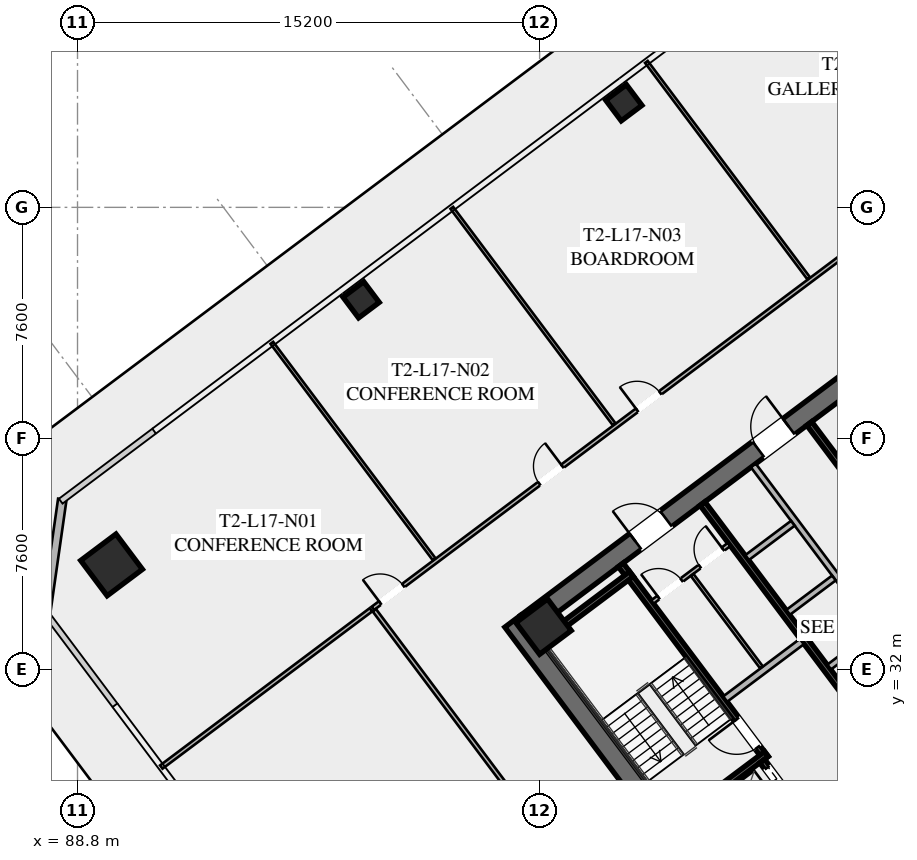
"""IFC4 building model, lengths in metres.
Left out: names, types, materials, properties, quantities, classifications, styles, units other than length and angle.
Written with IfcOpenShell. Run it as: python <this file> out.ifc"""

import sys

from ifc_helpers import new_model, si_unit, direction, frame, frame_2d, origin, origin_2d, place, context, subcontext, project, spatial, rectangle, hollow_rectangle, extrude, element, fill, save


model = new_model("IFC4")
c1 = context("Model", 3, precision=1e-05, world=origin(), true_north=direction((0.0, 1.0)))
c2 = subcontext(c1, "Body", "Model", "MODEL_VIEW")
j1 = project(units=[si_unit("LENGTHUNIT", "METRE"), si_unit("PLANEANGLEUNIT", "RADIAN")], contexts=[c1])
p1 = place(None, origin())
s1 = spatial("IfcSite", under=j1, at=p1, CompositionType="ELEMENT")
p2 = place(p1, origin())
s2 = spatial("IfcBuilding", under=s1, at=p2, CompositionType="ELEMENT")
p3 = place(p2, frame((0.0, 0.0, 67.2)))
s3 = spatial("IfcBuildingStorey", under=s2, at=p3, CompositionType="ELEMENT", Elevation=67.2)
p4 = place(p3, frame((112.476, 21.107, 0.0), z_axis=(0.0, 0.0, 1.0), x_axis=(-0.600005007985, 0.799996243986, 0.0)))
e1 = element("IfcWall", 1, at=p4, inside=s3, PredefinedType="SHEAR", context=c2, shape_type="SweptSolid", body=[
    extrude(rectangle(XDim=15.6, YDim=0.65, at=frame_2d((7.8, 0.0))), origin(), (0.0, 0.0, 1.0), 3.55),
])
p5 = place(p3, frame((124.429, 30.478, 0.0), z_axis=(0.0, 0.0, 1.0), x_axis=(-0.799998028465, -0.600002628705, 0.0)))
e2 = element("IfcWall", 2, at=p5, inside=s3, PredefinedType="SHEAR", context=c2, shape_type="SweptSolid", body=[
    extrude(rectangle(XDim=14.86, YDim=0.65, at=frame_2d((7.43, 0.0))), origin(), (0.0, 0.0, 1.0), 3.55),
])
p6 = place(p5, frame((9.13, 0.0, 0.0)))
e3 = element("IfcOpeningElement", 3, at=p6, cuts=e2, PredefinedType="OPENING", context=c2, shape_type="SweptSolid", body=[
    extrude(rectangle(XDim=1.25, YDim=2.25, at=frame_2d((0.625, 1.125))), frame((0.0, 0.335, 0.0), z_axis=(0.0, -1.0, 0.0), x_axis=(1.0, 0.0, 0.0)), (0.0, 0.0, 1.0), 0.67),
])
p7 = place(p5, frame((4.08, 0.0, 0.0)))
e4 = element("IfcOpeningElement", 4, at=p7, cuts=e2, PredefinedType="OPENING", context=c2, shape_type="SweptSolid", body=[
    extrude(rectangle(XDim=1.25, YDim=2.25, at=frame_2d((0.625, 1.125))), frame((0.0, 0.335, 0.0), z_axis=(0.0, -1.0, 0.0), x_axis=(1.0, 0.0, 0.0)), (0.0, 0.0, 1.0), 0.67),
])
p8 = place(p3, frame((103.571, 33.522, 0.0), z_axis=(0.0, 0.0, 1.0), x_axis=(0.799998028465, 0.600002628705, 0.0)))
e5 = element("IfcWall", 5, at=p8, inside=s3, PredefinedType="SHEAR", context=c2, shape_type="SweptSolid", body=[
    extrude(rectangle(XDim=14.86, YDim=0.65, at=frame_2d((7.43, 0.0))), origin(), (0.0, 0.0, 1.0), 3.55),
])
p9 = place(p8, frame((4.48, 0.0, 0.0)))
e6 = element("IfcOpeningElement", 6, at=p9, cuts=e5, PredefinedType="OPENING", context=c2, shape_type="SweptSolid", body=[
    extrude(rectangle(XDim=1.25, YDim=2.25, at=frame_2d((0.625, 1.125))), frame((0.0, 0.335, 0.0), z_axis=(0.0, -1.0, 0.0), x_axis=(1.0, 0.0, 0.0)), (0.0, 0.0, 1.0), 0.67),
])
p10 = place(p8, frame((9.53, 0.0, 0.0)))
e7 = element("IfcOpeningElement", 7, at=p10, cuts=e5, PredefinedType="OPENING", context=c2, shape_type="SweptSolid", body=[
    extrude(rectangle(XDim=1.25, YDim=2.25, at=frame_2d((0.625, 1.125))), frame((0.0, 0.335, 0.0), z_axis=(0.0, -1.0, 0.0), x_axis=(1.0, 0.0, 0.0)), (0.0, 0.0, 1.0), 0.67),
])
p11 = place(p3, frame((104.13, 33.41, 0.0), z_axis=(0.0, 0.0, 1.0), x_axis=(0.799999996291, 0.600000004945, 0.0)))
e8 = element("IfcColumn", 8, at=p11, inside=s3, PredefinedType="COLUMN", context=c2, shape_type="SweptSolid", body=[
    extrude(hollow_rectangle(XDim=1.3, YDim=1.3, WallThickness=0.05, at=origin_2d()), origin(), (0.0, 0.0, 1.0), 3.35),
])
p12 = place(p3, frame((89.92, 35.44, -0.195), z_axis=(0.0, 0.0, 1.0), x_axis=(0.799999996291, 0.600000004945, 0.0)))
e9 = element("IfcColumn", 9, at=p12, inside=s3, PredefinedType="COLUMN", context=c2, shape_type="SweptSolid", body=[
    extrude(hollow_rectangle(XDim=1.45, YDim=1.45, WallThickness=0.055, at=origin_2d()), origin(), (0.0, 0.0, 1.0), 3.545),
])
for number, where, z_axis, x_axis in (
    (10, (106.77, 50.64, -0.195), (0.0, 0.0, 1.0), (0.8, 0.6, 0.0)),
    (11, (98.13, 44.16, -0.195), (0.0, 0.0, 1.0), (0.8, 0.6, 0.0)),
):
    element("IfcColumn", number, at=place(p3, frame(where, z_axis=z_axis, x_axis=x_axis)), inside=s3, PredefinedType="COLUMN", context=c2, shape_type="SweptSolid", body=[
        extrude(hollow_rectangle(XDim=0.85, YDim=0.85, WallThickness=0.035, at=origin_2d()), origin(), (0.0, 0.0, 1.0), 3.545),
    ])
p13 = place(p3, frame((87.76, 33.82, 0.0), z_axis=(0.0, 0.0, 1.0), x_axis=(0.141430307517, 0.989948214866, 0.0)))
e12 = element("IfcWall", 12, at=p13, inside=s3, PredefinedType="SOLIDWALL", context=c2, shape_type="SweptSolid", body=[
    extrude(rectangle(XDim=3.818, YDim=0.28, at=frame_2d((1.909, 0.0))), origin(), (0.0, 0.0, 1.0), 3.35),
])
p14 = place(p3, frame((111.44, 29.08, 0.0), z_axis=(0.0, 0.0, 1.0), x_axis=(-0.600009827119, 0.799992629566, 0.0)))
e13 = element("IfcWall", 13, at=p14, inside=s3, PredefinedType="SHEAR", context=c2, shape_type="SweptSolid", body=[
    extrude(rectangle(XDim=7.95, YDim=0.2, at=frame_2d((3.975, 0.0))), origin(), (0.0, 0.0, 1.0), 3.35),
])
p15 = place(p14, frame((0.45, 0.0, 0.0)))
e14 = element("IfcOpeningElement", 14, at=p15, cuts=e13, PredefinedType="OPENING", context=c2, shape_type="SweptSolid", body=[
    extrude(rectangle(XDim=1.15, YDim=2.2, at=frame_2d((0.575, 1.1))), frame((0.0, 0.11, 0.0), z_axis=(0.0, -1.0, 0.0), x_axis=(1.0, 0.0, 0.0)), (0.0, 0.0, 1.0), 0.22),
])
for number, where, z_axis, x_axis in (
    (15, (108.476, 26.982, 0.0), (0.0, 0.0, 1.0), (0.8, 0.6, 0.0)),
    (16, (104.036, 32.902, 0.0), (0.0, 0.0, 1.0), (0.8, 0.6, 0.0)),
):
    element("IfcWall", number, at=place(p3, frame(where, z_axis=z_axis, x_axis=x_axis)), inside=s3, PredefinedType="SHEAR", context=c2, shape_type="SweptSolid", body=[
        extrude(rectangle(XDim=3.73, YDim=0.2, at=frame_2d((1.865, 0.0))), origin(), (0.0, 0.0, 1.0), 3.35),
    ])
p16 = place(p3, frame((117.938, 26.016, 0.0), z_axis=(0.0, 0.0, 1.0), x_axis=(-0.600005463273, 0.799995902516, 0.0)))
e17 = element("IfcWall", 17, at=p16, inside=s3, PredefinedType="SHEAR", context=c2, shape_type="SweptSolid", body=[
    extrude(rectangle(XDim=14.3, YDim=0.2, at=frame_2d((7.15, 0.0))), origin(), (0.0, 0.0, 1.0), 3.35),
])
p17 = place(p3, frame((110.104, 31.028, 0.0), z_axis=(0.0, 0.0, 1.0), x_axis=(0.800018601094, 0.59997519774, 0.0)))
e18 = element("IfcWall", 18, at=p17, inside=s3, PredefinedType="SOLIDWALL", context=c2, shape_type="SweptSolid", body=[
    extrude(rectangle(XDim=3.15, YDim=0.22, at=frame_2d((1.575, 0.0))), origin(), (0.0, 0.0, 1.0), 2.703),
])
p18 = place(p3, frame((115.13, 23.91, 0.0), z_axis=(0.0, 0.0, 1.0), x_axis=(-0.599975393228, 0.800018454488, 0.0)))
e19 = element("IfcWall", 19, at=p18, inside=s3, PredefinedType="SHEAR", context=c2, shape_type="SweptSolid", body=[
    extrude(rectangle(XDim=6.35, YDim=0.2, at=frame_2d((3.175, 0.0))), origin(), (0.0, 0.0, 1.0), 3.35),
])
p19 = place(p18, frame((4.775, 0.0, 0.0)))
e20 = element("IfcOpeningElement", 20, at=p19, cuts=e19, PredefinedType="OPENING", context=c2, shape_type="SweptSolid", body=[
    extrude(rectangle(XDim=1.3, YDim=2.25, at=frame_2d((0.65, 1.125))), frame((0.0, 0.11, 0.0), z_axis=(0.0, -1.0, 0.0), x_axis=(1.0, 0.0, 0.0)), (0.0, 0.0, 1.0), 0.22),
])
p20 = place(p18, frame((2.775, 0.0, 0.0)))
e21 = element("IfcOpeningElement", 21, at=p20, cuts=e19, PredefinedType="OPENING", context=c2, shape_type="SweptSolid", body=[
    extrude(rectangle(XDim=1.3, YDim=2.25, at=frame_2d((0.65, 1.125))), frame((0.0, 0.11, 0.0), z_axis=(0.0, -1.0, 0.0), x_axis=(1.0, 0.0, 0.0)), (0.0, 0.0, 1.0), 0.22),
])
p21 = place(p18, frame((0.575, 0.0, 0.0)))
e22 = element("IfcOpeningElement", 22, at=p21, cuts=e19, PredefinedType="OPENING", context=c2, shape_type="SweptSolid", body=[
    extrude(rectangle(XDim=1.3, YDim=2.25, at=frame_2d((0.65, 1.125))), frame((0.0, 0.11, 0.0), z_axis=(0.0, -1.0, 0.0), x_axis=(1.0, 0.0, 0.0)), (0.0, 0.0, 1.0), 0.22),
])
p22 = place(p3, frame((112.87, 40.09, 0.0), z_axis=(0.0, 0.0, 1.0), x_axis=(0.599975393228, -0.800018454488, 0.0)))
e23 = element("IfcWall", 23, at=p22, inside=s3, PredefinedType="SHEAR", context=c2, shape_type="SweptSolid", body=[
    extrude(rectangle(XDim=6.35, YDim=0.2, at=frame_2d((3.175, 0.0))), origin(), (0.0, 0.0, 1.0), 3.35),
])
p23 = place(p3, frame((107.71, 34.22, 0.0), z_axis=(0.0, 0.0, 1.0), x_axis=(0.799981399002, 0.60002480053, 0.0)))
e24 = element("IfcWall", 24, at=p23, inside=s3, PredefinedType="PARTITIONING", context=c2, shape_type="SweptSolid", body=[
    extrude(rectangle(XDim=3.15, YDim=0.135, at=frame_2d((1.575, 0.0))), origin(), (0.0, 0.0, 1.0), 2.703),
])
p24 = place(p23, frame((0.25, 0.0, 0.0)))
e25 = element("IfcOpeningElement", 25, at=p24, cuts=e24, PredefinedType="OPENING", context=c2, shape_type="SweptSolid", body=[
    extrude(rectangle(XDim=0.95, YDim=2.05, at=frame_2d((0.475, 1.025))), frame((0.0, 0.077, 0.0), z_axis=(0.0, -1.0, 0.0), x_axis=(1.0, 0.0, 0.0)), (0.0, 0.0, 1.0), 0.155),
])
p25 = place(p23, frame((1.95, 0.0, 0.0)))
e26 = element("IfcOpeningElement", 26, at=p25, cuts=e24, PredefinedType="OPENING", context=c2, shape_type="SweptSolid", body=[
    extrude(rectangle(XDim=0.95, YDim=2.05, at=frame_2d((0.475, 1.025))), frame((0.0, 0.077, 0.0), z_axis=(0.0, -1.0, 0.0), x_axis=(1.0, 0.0, 0.0)), (0.0, 0.0, 1.0), 0.155),
])
p26 = place(p3, frame((111.296, 32.072, 0.0), z_axis=(0.0, 0.0, 1.0), x_axis=(-0.59995887973, 0.800030838552, 0.0)))
e27 = element("IfcWall", 27, at=p26, inside=s3, PredefinedType="PARTITIONING", context=c2, shape_type="SweptSolid", body=[
    extrude(rectangle(XDim=3.8, YDim=0.11, at=frame_2d((1.9, 0.0))), origin(), (0.0, 0.0, 1.0), 2.703),
])
p27 = place(p3, frame((115.11, 33.27, 0.0), z_axis=(0.0, 0.0, 1.0), x_axis=(-0.600011488909, 0.79999138319, 0.0)))
e28 = element("IfcWall", 28, at=p27, inside=s3, PredefinedType="SOLIDWALL", context=c2, shape_type="SweptSolid", body=[
    extrude(rectangle(XDim=6.8, YDim=0.2, at=frame_2d((3.4, 0.0))), origin(), (0.0, 0.0, 1.0), 3.35),
])
p28 = place(p3, frame((113.526, 32.082, 0.0), z_axis=(0.0, 0.0, 1.0), x_axis=(0.800046745961, 0.599937666993, 0.0)))
e29 = element("IfcWall", 29, at=p28, inside=s3, PredefinedType="SOLIDWALL", context=c2, shape_type="SweptSolid", body=[
    extrude(rectangle(XDim=1.88, YDim=0.2, at=frame_2d((0.94, 0.0))), origin(), (0.0, 0.0, 1.0), 3.35),
])
p29 = place(p3, frame((112.176, 33.882, 0.0), z_axis=(0.0, 0.0, 1.0), x_axis=(0.8, 0.6, 0.0)))
e30 = element("IfcWall", 30, at=p29, inside=s3, PredefinedType="SOLIDWALL", context=c2, shape_type="SweptSolid", body=[
    extrude(rectangle(XDim=1.88, YDim=0.2, at=frame_2d((0.94, 0.0))), origin(), (0.0, 0.0, 1.0), 3.35),
])
p30 = place(p3, frame((110.826, 35.682, 0.0), z_axis=(0.0, 0.0, 1.0), x_axis=(0.799984418148, 0.600020775241, 0.0)))
e31 = element("IfcWall", 31, at=p30, inside=s3, PredefinedType="SOLIDWALL", context=c2, shape_type="SweptSolid", body=[
    extrude(rectangle(XDim=1.88, YDim=0.2, at=frame_2d((0.94, 0.0))), origin(), (0.0, 0.0, 1.0), 3.35),
])
p31 = place(p3, frame((98.516, 34.012, 0.0), z_axis=(0.0, 0.0, 1.0), x_axis=(0.8, 0.6, 0.0)))
e32 = element("IfcWall", 32, at=p31, inside=s3, PredefinedType="PARTITIONING", context=c2, shape_type="SweptSolid", body=[
    extrude(rectangle(XDim=28.23, YDim=0.135, at=frame_2d((14.115, 0.0))), origin(), (0.0, 0.0, 1.0), 2.703),
])
p32 = place(p31, frame((0.3, 0.0, 0.0)))
e33 = element("IfcOpeningElement", 33, at=p32, cuts=e32, PredefinedType="OPENING", context=c2, shape_type="SweptSolid", body=[
    extrude(rectangle(XDim=0.95, YDim=2.05, at=frame_2d((0.475, 1.025))), frame((0.0, 0.077, 0.0), z_axis=(0.0, -1.0, 0.0), x_axis=(1.0, 0.0, 0.0)), (0.0, 0.0, 1.0), 0.155),
])
p33 = place(p31, frame((6.84, 0.0, 0.0)))
e34 = element("IfcOpeningElement", 34, at=p33, cuts=e32, PredefinedType="OPENING", context=c2, shape_type="SweptSolid", body=[
    extrude(rectangle(XDim=0.95, YDim=2.05, at=frame_2d((0.475, 1.025))), frame((0.0, 0.077, 0.0), z_axis=(0.0, -1.0, 0.0), x_axis=(1.0, 0.0, 0.0)), (0.0, 0.0, 1.0), 0.155),
])
p34 = place(p31, frame((10.863, 0.0, 0.0)))
e35 = element("IfcOpeningElement", 35, at=p34, cuts=e32, PredefinedType="OPENING", context=c2, shape_type="SweptSolid", body=[
    extrude(rectangle(XDim=0.95, YDim=2.05, at=frame_2d((0.475, 1.025))), frame((0.0, 0.077, 0.0), z_axis=(0.0, -1.0, 0.0), x_axis=(1.0, 0.0, 0.0)), (0.0, 0.0, 1.0), 0.155),
])
p35 = place(p31, frame((26.98, 0.0, 0.0)))
e36 = element("IfcOpeningElement", 36, at=p35, cuts=e32, PredefinedType="OPENING", context=c2, shape_type="SweptSolid", body=[
    extrude(rectangle(XDim=0.95, YDim=2.05, at=frame_2d((0.475, 1.025))), frame((0.0, 0.077, 0.0), z_axis=(0.0, -1.0, 0.0), x_axis=(1.0, 0.0, 0.0)), (0.0, 0.0, 1.0), 0.155),
])
for number, where, z_axis, x_axis in (
    (37, (100.532, 35.624, 0.0), (0.0, 0.0, 1.0), (-0.6, 0.8, 0.0)),
    (38, (106.452, 40.064, 0.0), (0.0, 0.0, 1.0), (-0.6, 0.8, 0.0)),
    (39, (112.852, 44.864, 0.0), (0.0, 0.0, 1.0), (-0.6, 0.8, 0.0)),
):
    element("IfcWall", number, at=place(p3, frame(where, z_axis=z_axis, x_axis=x_axis)), inside=s3, PredefinedType="PARTITIONING", context=c2, shape_type="SweptSolid", body=[
        extrude(rectangle(XDim=8.9, YDim=0.11, at=frame_2d((4.45, 0.0))), origin(), (0.0, 0.0, 1.0), 2.703),
    ])
p36 = place(p3, frame((134.18, 33.51, 0.0), z_axis=(0.0, 0.0, 1.0), x_axis=(-0.8, -0.6, 0.0)))
e40 = element("IfcWall", 40, at=p36, inside=s3, PredefinedType="PARTITIONING", context=c2, shape_type="SweptSolid", body=[
    extrude(rectangle(XDim=28.23, YDim=0.135, at=frame_2d((14.115, 0.0))), origin(), (0.0, 0.0, 1.0), 2.703),
])
p37 = place(p36, frame((26.9, 0.0, 0.0)))
e41 = element("IfcOpeningElement", 41, at=p37, cuts=e40, PredefinedType="OPENING", context=c2, shape_type="SweptSolid", body=[
    extrude(rectangle(XDim=0.95, YDim=2.05, at=frame_2d((0.475, 1.025))), frame((0.0, 0.077, 0.0), z_axis=(0.0, -1.0, 0.0), x_axis=(1.0, 0.0, 0.0)), (0.0, 0.0, 1.0), 0.155),
])
p38 = place(p36, frame((20.399, 0.0, 0.0)))
e42 = element("IfcOpeningElement", 42, at=p38, cuts=e40, PredefinedType="OPENING", context=c2, shape_type="SweptSolid", body=[
    extrude(rectangle(XDim=0.95, YDim=2.05, at=frame_2d((0.475, 1.025))), frame((0.0, 0.077, 0.0), z_axis=(0.0, -1.0, 0.0), x_axis=(1.0, 0.0, 0.0)), (0.0, 0.0, 1.0), 0.155),
])
p39 = place(p36, frame((16.339, 0.0, 0.0)))
e43 = element("IfcOpeningElement", 43, at=p39, cuts=e40, PredefinedType="OPENING", context=c2, shape_type="SweptSolid", body=[
    extrude(rectangle(XDim=0.95, YDim=2.05, at=frame_2d((0.475, 1.025))), frame((0.0, 0.077, 0.0), z_axis=(0.0, -1.0, 0.0), x_axis=(1.0, 0.0, 0.0)), (0.0, 0.0, 1.0), 0.155),
])
p40 = place(p36, frame((0.38, 0.0, 0.0)))
e44 = element("IfcOpeningElement", 44, at=p40, cuts=e40, PredefinedType="OPENING", context=c2, shape_type="SweptSolid", body=[
    extrude(rectangle(XDim=0.95, YDim=2.05, at=frame_2d((0.475, 1.025))), frame((0.0, 0.077, 0.0), z_axis=(0.0, -1.0, 0.0), x_axis=(1.0, 0.0, 0.0)), (0.0, 0.0, 1.0), 0.155),
])
p41 = place(p3, frame((111.548, 16.636, 0.0), z_axis=(0.0, 0.0, 1.0), x_axis=(-0.600003610192, 0.799997292343, 0.0)))
e45 = element("IfcWall", 45, at=p41, inside=s3, PredefinedType="PARTITIONING", context=c2, shape_type="SweptSolid", body=[
    extrude(rectangle(XDim=21.64, YDim=0.135, at=frame_2d((10.82, 0.0))), origin(), (0.0, 0.0, 1.0), 2.703),
])
p42 = place(p41, frame((0.3, 0.0, 0.0)))
e46 = element("IfcOpeningElement", 46, at=p42, cuts=e45, PredefinedType="OPENING", context=c2, shape_type="SweptSolid", body=[
    extrude(rectangle(XDim=0.95, YDim=2.05, at=frame_2d((0.475, 1.025))), frame((0.0, 0.077, 0.0), z_axis=(0.0, -1.0, 0.0), x_axis=(1.0, 0.0, 0.0)), (0.0, 0.0, 1.0), 0.155),
])
p43 = place(p3, frame((98.452, 33.964, 0.0), z_axis=(0.0, 0.0, 1.0), x_axis=(-0.799993202584, -0.600009063115, 0.0)))
e47 = element("IfcWall", 47, at=p43, inside=s3, PredefinedType="PARTITIONING", context=c2, shape_type="SweptSolid", body=[
    extrude(rectangle(XDim=8.62, YDim=0.135, at=frame_2d((4.31, 0.0))), origin(), (0.0, 0.0, 1.0), 2.703),
])
p44 = place(p9, origin())
e48 = element("IfcDoor", 48, at=p44, inside=s3, OperationType="SINGLE_SWING_LEFT", PredefinedType="DOOR", context=c2, shape_type="SweptSolid", body=[
    extrude(rectangle(XDim=1.25, YDim=2.25, at=frame_2d((0.625, 1.125))), frame((0.0, 0.025, 0.0), z_axis=(0.0, -1.0, 0.0), x_axis=(1.0, 0.0, 0.0)), (0.0, 0.0, 1.0), 0.05),
])
fill(e6, e48)
p45 = place(p10, origin())
e49 = element("IfcDoor", 49, at=p45, inside=s3, OperationType="SINGLE_SWING_RIGHT", PredefinedType="DOOR", context=c2, shape_type="SweptSolid", body=[
    extrude(rectangle(XDim=1.25, YDim=2.25, at=frame_2d((0.625, 1.125))), frame((0.0, 0.025, 0.0), z_axis=(0.0, -1.0, 0.0), x_axis=(1.0, 0.0, 0.0)), (0.0, 0.0, 1.0), 0.05),
])
fill(e7, e49)
p46 = place(p15, origin())
e50 = element("IfcDoor", 50, at=p46, inside=s3, OperationType="SINGLE_SWING_RIGHT", PredefinedType="DOOR", context=c2, shape_type="SweptSolid", body=[
    extrude(rectangle(XDim=1.15, YDim=2.2, at=frame_2d((0.575, 1.1))), frame((0.0, 0.025, 0.0), z_axis=(0.0, -1.0, 0.0), x_axis=(1.0, 0.0, 0.0)), (0.0, 0.0, 1.0), 0.05),
])
fill(e14, e50)
p47 = place(p24, origin())
e51 = element("IfcDoor", 51, at=p47, inside=s3, OperationType="SINGLE_SWING_LEFT", PredefinedType="DOOR", context=c2, shape_type="SweptSolid", body=[
    extrude(rectangle(XDim=0.95, YDim=2.05, at=frame_2d((0.475, 1.025))), frame((0.0, 0.025, 0.0), z_axis=(0.0, -1.0, 0.0), x_axis=(1.0, 0.0, 0.0)), (0.0, 0.0, 1.0), 0.05),
])
fill(e25, e51)
p48 = place(p25, origin())
e52 = element("IfcDoor", 52, at=p48, inside=s3, OperationType="SINGLE_SWING_RIGHT", PredefinedType="DOOR", context=c2, shape_type="SweptSolid", body=[
    extrude(rectangle(XDim=0.95, YDim=2.05, at=frame_2d((0.475, 1.025))), frame((0.0, 0.025, 0.0), z_axis=(0.0, -1.0, 0.0), x_axis=(1.0, 0.0, 0.0)), (0.0, 0.0, 1.0), 0.05),
])
fill(e26, e52)
p49 = place(p32, origin())
e53 = element("IfcDoor", 53, at=p49, inside=s3, OperationType="SINGLE_SWING_LEFT", PredefinedType="DOOR", context=c2, shape_type="SweptSolid", body=[
    extrude(rectangle(XDim=0.95, YDim=2.05, at=frame_2d((0.475, 1.025))), frame((0.0, 0.025, 0.0), z_axis=(0.0, -1.0, 0.0), x_axis=(1.0, 0.0, 0.0)), (0.0, 0.0, 1.0), 0.05),
])
fill(e33, e53)
p50 = place(p33, origin())
e54 = element("IfcDoor", 54, at=p50, inside=s3, OperationType="SINGLE_SWING_RIGHT", PredefinedType="DOOR", context=c2, shape_type="SweptSolid", body=[
    extrude(rectangle(XDim=0.95, YDim=2.05, at=frame_2d((0.475, 1.025))), frame((0.0, 0.025, 0.0), z_axis=(0.0, -1.0, 0.0), x_axis=(1.0, 0.0, 0.0)), (0.0, 0.0, 1.0), 0.05),
])
fill(e34, e54)
p51 = place(p34, origin())
e55 = element("IfcDoor", 55, at=p51, inside=s3, OperationType="SINGLE_SWING_LEFT", PredefinedType="DOOR", context=c2, shape_type="SweptSolid", body=[
    extrude(rectangle(XDim=0.95, YDim=2.05, at=frame_2d((0.475, 1.025))), frame((0.0, 0.025, 0.0), z_axis=(0.0, -1.0, 0.0), x_axis=(1.0, 0.0, 0.0)), (0.0, 0.0, 1.0), 0.05),
])
fill(e35, e55)
p52 = place(p19, origin())
e56 = element("IfcDoor", 56, at=p52, inside=s3, OperationType="SLIDING_TO_LEFT", PredefinedType="DOOR", context=c2, shape_type="SweptSolid", body=[
    extrude(rectangle(XDim=1.3, YDim=2.25, at=frame_2d((0.65, 1.125))), frame((0.0, 0.025, 0.0), z_axis=(0.0, -1.0, 0.0), x_axis=(1.0, 0.0, 0.0)), (0.0, 0.0, 1.0), 0.05),
])
fill(e20, e56)
save(model, sys.argv[1])
